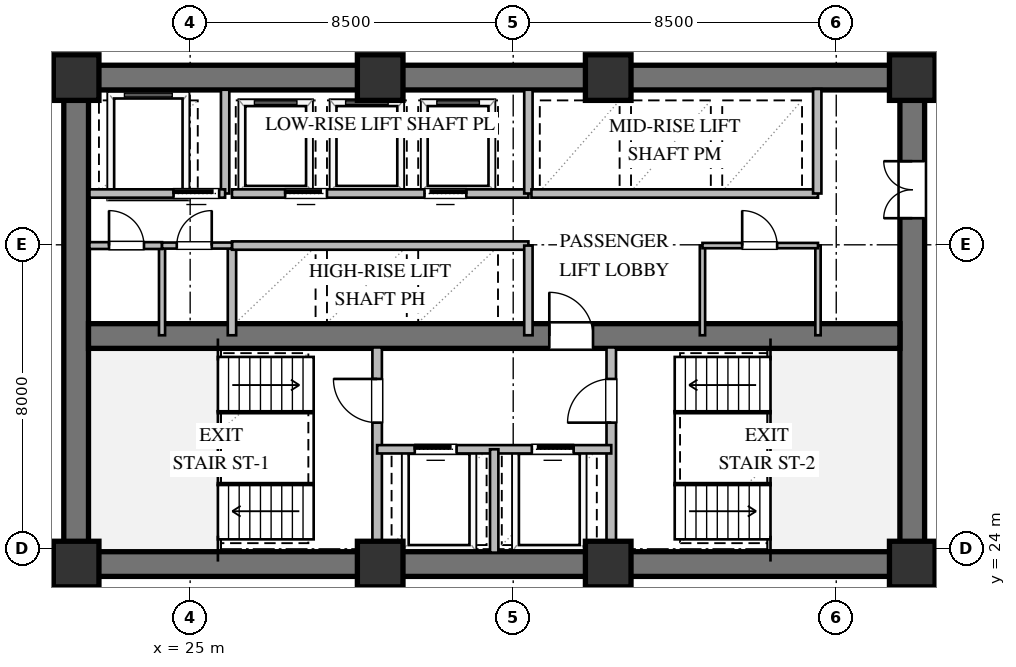
"""IFC4 building model, lengths in metres.
Left out: names, types, materials, properties, quantities, classifications, styles, units other than length and angle.
Written with IfcOpenShell. Run it as: python <this file> out.ifc"""

import sys

from ifc_helpers import new_model, si_unit, direction, frame, frame_2d, origin, origin_2d, place, context, subcontext, project, spatial, rectangle, extrude, element, fill, save


model = new_model("IFC4")
c1 = context("Model", 3, precision=1e-05, world=origin(), true_north=direction((0.0, 1.0)))
c2 = subcontext(c1, "Body", "Model", "MODEL_VIEW")
j1 = project(units=[si_unit("LENGTHUNIT", "METRE"), si_unit("PLANEANGLEUNIT", "RADIAN")], contexts=[c1])
p1 = place(None, origin())
s1 = spatial("IfcSite", under=j1, at=p1, CompositionType="ELEMENT")
p2 = place(p1, origin())
s2 = spatial("IfcBuilding", under=s1, at=p2, CompositionType="ELEMENT")
p3 = place(p2, frame((0.0, 0.0, 60.0)))
s3 = spatial("IfcBuildingStorey", under=s2, at=p3, CompositionType="ELEMENT", Elevation=60.0)
for number, where, z_axis, x_axis in (
    (1, (21.675, 23.6, 0.0), (0.0, 0.0, 1.0), (1.0, 0.0, 0.0)),
    (2, (21.675, 36.4, 0.0), (0.0, 0.0, 1.0), (1.0, 0.0, 0.0)),
):
    element("IfcWall", number, at=place(p3, frame(where, z_axis=z_axis, x_axis=x_axis)), inside=s3, PredefinedType="SHEAR", context=c2, shape_type="SweptSolid", body=[
        extrude(rectangle(XDim=22.65, YDim=0.65, at=frame_2d((11.325, 0.0))), origin(), (0.0, 0.0, 1.0), 3.36),
    ])
p4 = place(p3, frame((22.0, 23.925, 0.0), z_axis=(0.0, 0.0, 1.0), x_axis=(0.0, 1.0, 0.0)))
e3 = element("IfcWall", 3, at=p4, inside=s3, PredefinedType="SHEAR", context=c2, shape_type="SweptSolid", body=[
    extrude(rectangle(XDim=12.15, YDim=0.65, at=frame_2d((6.075, 0.0))), origin(), (0.0, 0.0, 1.0), 3.36),
])
p5 = place(p3, frame((44.0, 23.925, 0.0), z_axis=(0.0, 0.0, 1.0), x_axis=(0.0, 1.0, 0.0)))
e4 = element("IfcWall", 4, at=p5, inside=s3, PredefinedType="SHEAR", context=c2, shape_type="SweptSolid", body=[
    extrude(rectangle(XDim=12.15, YDim=0.65, at=frame_2d((6.075, 0.0))), origin(), (0.0, 0.0, 1.0), 3.36),
])
p6 = place(p5, frame((8.775, 0.0, 0.0)))
e5 = element("IfcOpeningElement", 5, at=p6, cuts=e4, PredefinedType="OPENING", context=c2, shape_type="SweptSolid", body=[
    extrude(rectangle(XDim=1.5, YDim=2.15, at=frame_2d((0.75, 1.075))), frame((0.0, 0.335, 0.0), z_axis=(0.0, -1.0, 0.0), x_axis=(1.0, 0.0, 0.0)), (0.0, 0.0, 1.0), 0.67),
])
p7 = place(p3, frame((22.325, 29.6, 0.0), z_axis=(0.0, 0.0, 1.0), x_axis=(1.0, 0.0, 0.0)))
e6 = element("IfcWall", 6, at=p7, inside=s3, PredefinedType="SHEAR", context=c2, shape_type="SweptSolid", body=[
    extrude(rectangle(XDim=21.35, YDim=0.65, at=frame_2d((10.675, 0.0))), origin(), (0.0, 0.0, 1.0), 3.36),
])
p8 = place(p7, frame((12.125, 0.0, 0.0)))
e7 = element("IfcOpeningElement", 7, at=p8, cuts=e6, PredefinedType="OPENING", context=c2, shape_type="SweptSolid", body=[
    extrude(rectangle(XDim=1.15, YDim=2.1, at=frame_2d((0.575, 1.05))), frame((0.0, 0.335, 0.0), z_axis=(0.0, -1.0, 0.0), x_axis=(1.0, 0.0, 0.0)), (0.0, 0.0, 1.0), 0.67),
])
for number, where, z_axis, x_axis in (
    (8, (22.0, 23.6, 0.0), (0.0, 0.0, 1.0), (1.0, 0.0, 0.0)),
    (9, (30.0, 23.6, 0.0), (0.0, 0.0, 1.0), (1.0, 0.0, 0.0)),
    (10, (36.0, 23.6, 0.0), (0.0, 0.0, 1.0), (1.0, 0.0, 0.0)),
    (11, (44.0, 23.6, 0.0), (0.0, 0.0, 1.0), (1.0, 0.0, 0.0)),
    (12, (44.0, 36.4, 0.0), (0.0, 0.0, 1.0), (1.0, 0.0, 0.0)),
    (13, (36.0, 36.4, 0.0), (0.0, 0.0, 1.0), (1.0, 0.0, 0.0)),
    (14, (30.0, 36.4, 0.0), (0.0, 0.0, 1.0), (1.0, 0.0, 0.0)),
    (15, (22.0, 36.4, 0.0), (0.0, 0.0, 1.0), (1.0, 0.0, 0.0)),
):
    element("IfcColumn", number, at=place(p3, frame(where, z_axis=z_axis, x_axis=x_axis)), inside=s3, PredefinedType="COLUMN", context=c2, shape_type="SweptSolid", body=[
        extrude(rectangle(XDim=1.2, YDim=1.2, at=origin_2d()), origin(), (0.0, 0.0, 1.0), 3.6),
    ])
p9 = place(p3, frame((29.92, 23.9, 0.0), z_axis=(0.0, 0.0, 1.0), x_axis=(0.0, 1.0, 0.0)))
e16 = element("IfcWall", 16, at=p9, inside=s3, PredefinedType="SOLIDWALL", context=c2, shape_type="SweptSolid", body=[
    extrude(rectangle(XDim=5.4, YDim=0.25, at=frame_2d((2.7, 0.0))), origin(), (0.0, 0.0, 1.0), 3.36),
])
p10 = place(p9, frame((3.421, 0.0, 0.0)))
e17 = element("IfcOpeningElement", 17, at=p10, cuts=e16, PredefinedType="OPENING", context=c2, shape_type="SweptSolid", body=[
    extrude(rectangle(XDim=1.15, YDim=2.1, at=frame_2d((0.575, 1.05))), frame((0.0, 0.135, 0.0), z_axis=(0.0, -1.0, 0.0), x_axis=(1.0, 0.0, 0.0)), (0.0, 0.0, 1.0), 0.27),
])
p11 = place(p3, frame((36.08, 23.9, 0.0), z_axis=(0.0, 0.0, 1.0), x_axis=(0.0, 1.0, 0.0)))
e18 = element("IfcWall", 18, at=p11, inside=s3, PredefinedType="SOLIDWALL", context=c2, shape_type="SweptSolid", body=[
    extrude(rectangle(XDim=5.4, YDim=0.25, at=frame_2d((2.7, 0.0))), origin(), (0.0, 0.0, 1.0), 3.36),
])
p12 = place(p11, frame((3.421, 0.0, 0.0)))
e19 = element("IfcOpeningElement", 19, at=p12, cuts=e18, PredefinedType="OPENING", context=c2, shape_type="SweptSolid", body=[
    extrude(rectangle(XDim=1.15, YDim=2.1, at=frame_2d((0.575, 1.05))), frame((0.0, 0.135, 0.0), z_axis=(0.0, -1.0, 0.0), x_axis=(1.0, 0.0, 0.0)), (0.0, 0.0, 1.0), 0.27),
])
p13 = place(p3, frame((29.92, 26.62, 0.0), z_axis=(0.0, 0.0, 1.0), x_axis=(1.0, 0.0, 0.0)))
e20 = element("IfcWall", 20, at=p13, inside=s3, PredefinedType="SOLIDWALL", context=c2, shape_type="SweptSolid", body=[
    extrude(rectangle(XDim=6.16, YDim=0.22, at=frame_2d((3.08, 0.0))), origin(), (0.0, 0.0, 1.0), 3.36),
])
p14 = place(p13, frame((0.99, 0.0, 0.0)))
e21 = element("IfcOpeningElement", 21, at=p14, cuts=e20, PredefinedType="OPENING", context=c2, shape_type="SweptSolid", body=[
    extrude(rectangle(XDim=1.1, YDim=2.1, at=frame_2d((0.55, 1.05))), frame((0.0, 0.12, 0.0), z_axis=(0.0, -1.0, 0.0), x_axis=(1.0, 0.0, 0.0)), (0.0, 0.0, 1.0), 0.24),
])
p15 = place(p13, frame((4.07, 0.0, 0.0)))
e22 = element("IfcOpeningElement", 22, at=p15, cuts=e20, PredefinedType="OPENING", context=c2, shape_type="SweptSolid", body=[
    extrude(rectangle(XDim=1.1, YDim=2.1, at=frame_2d((0.55, 1.05))), frame((0.0, 0.12, 0.0), z_axis=(0.0, -1.0, 0.0), x_axis=(1.0, 0.0, 0.0)), (0.0, 0.0, 1.0), 0.24),
])
p16 = place(p3, frame((33.0, 23.9, 0.0), z_axis=(0.0, 0.0, 1.0), x_axis=(0.0, 1.0, 0.0)))
e23 = element("IfcWall", 23, at=p16, inside=s3, PredefinedType="SOLIDWALL", context=c2, shape_type="SweptSolid", body=[
    extrude(rectangle(XDim=2.72, YDim=0.22, at=frame_2d((1.36, 0.0))), origin(), (0.0, 0.0, 1.0), 3.36),
])
p17 = place(p3, frame((25.92, 33.35, 0.0), z_axis=(0.0, 0.0, 1.0), x_axis=(0.0, 1.0, 0.0)))
e24 = element("IfcWall", 24, at=p17, inside=s3, PredefinedType="SOLIDWALL", context=c2, shape_type="SweptSolid", body=[
    extrude(rectangle(XDim=2.73, YDim=0.22, at=frame_2d((1.365, 0.0))), origin(), (0.0, 0.0, 1.0), 3.36),
])
p18 = place(p3, frame((22.35, 33.35, 0.0), z_axis=(0.0, 0.0, 1.0), x_axis=(1.0, 0.0, 0.0)))
e25 = element("IfcWall", 25, at=p18, inside=s3, PredefinedType="SOLIDWALL", context=c2, shape_type="SweptSolid", body=[
    extrude(rectangle(XDim=3.57, YDim=0.22, at=frame_2d((1.785, 0.0))), origin(), (0.0, 0.0, 1.0), 3.36),
])
p19 = place(p18, frame((2.213, 0.0, 0.0)))
e26 = element("IfcOpeningElement", 26, at=p19, cuts=e25, PredefinedType="OPENING", context=c2, shape_type="SweptSolid", body=[
    extrude(rectangle(XDim=1.2, YDim=2.1, at=frame_2d((0.6, 1.05))), frame((0.0, 0.12, 0.0), z_axis=(0.0, -1.0, 0.0), x_axis=(1.0, 0.0, 0.0)), (0.0, 0.0, 1.0), 0.24),
])
p20 = place(p3, frame((26.1, 29.62, 0.0), z_axis=(0.0, 0.0, 1.0), x_axis=(0.0, 1.0, 0.0)))
e27 = element("IfcWall", 27, at=p20, inside=s3, PredefinedType="SOLIDWALL", context=c2, shape_type="SweptSolid", body=[
    extrude(rectangle(XDim=2.36, YDim=0.22, at=frame_2d((1.18, 0.0))), origin(), (0.0, 0.0, 1.0), 3.36),
])
p21 = place(p3, frame((26.1, 31.98, 0.0), z_axis=(0.0, 0.0, 1.0), x_axis=(1.0, 0.0, 0.0)))
e28 = element("IfcWall", 28, at=p21, inside=s3, PredefinedType="SOLIDWALL", context=c2, shape_type="SweptSolid", body=[
    extrude(rectangle(XDim=7.8, YDim=0.22, at=frame_2d((3.9, 0.0))), origin(), (0.0, 0.0, 1.0), 3.36),
])
p22 = place(p3, frame((33.9, 29.62, 0.0), z_axis=(0.0, 0.0, 1.0), x_axis=(0.0, 1.0, 0.0)))
e29 = element("IfcWall", 29, at=p22, inside=s3, PredefinedType="SOLIDWALL", context=c2, shape_type="SweptSolid", body=[
    extrude(rectangle(XDim=2.36, YDim=0.22, at=frame_2d((1.18, 0.0))), origin(), (0.0, 0.0, 1.0), 3.36),
])
p23 = place(p3, frame((26.1, 33.35, 0.0), z_axis=(0.0, 0.0, 1.0), x_axis=(1.0, 0.0, 0.0)))
e30 = element("IfcWall", 30, at=p23, inside=s3, PredefinedType="SOLIDWALL", context=c2, shape_type="SweptSolid", body=[
    extrude(rectangle(XDim=7.8, YDim=0.22, at=frame_2d((3.9, 0.0))), origin(), (0.0, 0.0, 1.0), 3.36),
])
p24 = place(p23, frame((1.4, 0.0, 0.0)))
e31 = element("IfcOpeningElement", 31, at=p24, cuts=e30, PredefinedType="OPENING", context=c2, shape_type="SweptSolid", body=[
    extrude(rectangle(XDim=1.1, YDim=2.1, at=frame_2d((0.55, 1.05))), frame((0.0, 0.12, 0.0), z_axis=(0.0, -1.0, 0.0), x_axis=(1.0, 0.0, 0.0)), (0.0, 0.0, 1.0), 0.24),
])
p25 = place(p23, frame((5.066, 0.0, 0.0)))
e32 = element("IfcOpeningElement", 32, at=p25, cuts=e30, PredefinedType="OPENING", context=c2, shape_type="SweptSolid", body=[
    extrude(rectangle(XDim=1.1, YDim=2.1, at=frame_2d((0.55, 1.05))), frame((0.0, 0.12, 0.0), z_axis=(0.0, -1.0, 0.0), x_axis=(1.0, 0.0, 0.0)), (0.0, 0.0, 1.0), 0.24),
])
p26 = place(p3, frame((33.9, 33.35, 0.0), z_axis=(0.0, 0.0, 1.0), x_axis=(0.0, 1.0, 0.0)))
e33 = element("IfcWall", 33, at=p26, inside=s3, PredefinedType="SOLIDWALL", context=c2, shape_type="SweptSolid", body=[
    extrude(rectangle(XDim=2.73, YDim=0.22, at=frame_2d((1.365, 0.0))), origin(), (0.0, 0.0, 1.0), 3.36),
])
p27 = place(p3, frame((33.98, 33.35, 0.0), z_axis=(0.0, 0.0, 1.0), x_axis=(1.0, 0.0, 0.0)))
e34 = element("IfcWall", 34, at=p27, inside=s3, PredefinedType="SOLIDWALL", context=c2, shape_type="SweptSolid", body=[
    extrude(rectangle(XDim=7.54, YDim=0.22, at=frame_2d((3.77, 0.0))), origin(), (0.0, 0.0, 1.0), 3.36),
])
p28 = place(p3, frame((41.5, 33.35, 0.0), z_axis=(0.0, 0.0, 1.0), x_axis=(0.0, 1.0, 0.0)))
e35 = element("IfcWall", 35, at=p28, inside=s3, PredefinedType="SOLIDWALL", context=c2, shape_type="SweptSolid", body=[
    extrude(rectangle(XDim=2.75, YDim=0.22, at=frame_2d((1.375, 0.0))), origin(), (0.0, 0.0, 1.0), 3.36),
])
p29 = place(p3, frame((24.26, 29.62, 0.0), z_axis=(0.0, 0.0, 1.0), x_axis=(0.0, 1.0, 0.0)))
e36 = element("IfcWall", 36, at=p29, inside=s3, PredefinedType="PLUMBINGWALL", context=c2, shape_type="SweptSolid", body=[
    extrude(rectangle(XDim=2.36, YDim=0.16, at=frame_2d((1.18, 0.0))), origin(), (0.0, 0.0, 1.0), 3.36),
])
p30 = place(p3, frame((22.35, 31.98, 0.0), z_axis=(0.0, 0.0, 1.0), x_axis=(1.0, 0.0, 0.0)))
e37 = element("IfcWall", 37, at=p30, inside=s3, PredefinedType="PARTITIONING", context=c2, shape_type="SweptSolid", body=[
    extrude(rectangle(XDim=1.91, YDim=0.18, at=frame_2d((0.955, 0.0))), origin(), (0.0, 0.0, 1.0), 3.36),
])
p31 = place(p30, frame((0.515, 0.0, 0.0)))
e38 = element("IfcOpeningElement", 38, at=p31, cuts=e37, PredefinedType="OPENING", context=c2, shape_type="SweptSolid", body=[
    extrude(rectangle(XDim=0.92, YDim=2.1, at=frame_2d((0.46, 1.05))), frame((0.0, 0.1, 0.0), z_axis=(0.0, -1.0, 0.0), x_axis=(1.0, 0.0, 0.0)), (0.0, 0.0, 1.0), 0.2),
])
p32 = place(p3, frame((24.26, 31.98, 0.0), z_axis=(0.0, 0.0, 1.0), x_axis=(1.0, 0.0, 0.0)))
e39 = element("IfcWall", 39, at=p32, inside=s3, PredefinedType="PLUMBINGWALL", context=c2, shape_type="SweptSolid", body=[
    extrude(rectangle(XDim=1.84, YDim=0.16, at=frame_2d((0.92, 0.0))), origin(), (0.0, 0.0, 1.0), 3.36),
])
p33 = place(p32, frame((0.388, 0.0, 0.0)))
e40 = element("IfcOpeningElement", 40, at=p33, cuts=e39, PredefinedType="OPENING", context=c2, shape_type="SweptSolid", body=[
    extrude(rectangle(XDim=0.92, YDim=2.1, at=frame_2d((0.46, 1.05))), frame((0.0, 0.09, 0.0), z_axis=(0.0, -1.0, 0.0), x_axis=(1.0, 0.0, 0.0)), (0.0, 0.0, 1.0), 0.18),
])
for number, where, z_axis, x_axis in (
    (41, (38.48, 29.62, 0.0), (0.0, 0.0, 1.0), (0.0, 1.0, 0.0)),
    (42, (41.52, 29.62, 0.0), (0.0, 0.0, 1.0), (0.0, 1.0, 0.0)),
):
    element("IfcWall", number, at=place(p3, frame(where, z_axis=z_axis, x_axis=x_axis)), inside=s3, PredefinedType="PARTITIONING", context=c2, shape_type="SweptSolid", body=[
        extrude(rectangle(XDim=2.36, YDim=0.14, at=frame_2d((1.18, 0.0))), origin(), (0.0, 0.0, 1.0), 3.36),
    ])
p34 = place(p3, frame((38.48, 31.98, 0.0), z_axis=(0.0, 0.0, 1.0), x_axis=(1.0, 0.0, 0.0)))
e43 = element("IfcWall", 43, at=p34, inside=s3, PredefinedType="PARTITIONING", context=c2, shape_type="SweptSolid", body=[
    extrude(rectangle(XDim=3.04, YDim=0.14, at=frame_2d((1.52, 0.0))), origin(), (0.0, 0.0, 1.0), 3.36),
])
p35 = place(p34, frame((1.045, 0.0, 0.0)))
e44 = element("IfcOpeningElement", 44, at=p35, cuts=e43, PredefinedType="OPENING", context=c2, shape_type="SweptSolid", body=[
    extrude(rectangle(XDim=0.92, YDim=2.1, at=frame_2d((0.46, 1.05))), frame((0.0, 0.08, 0.0), z_axis=(0.0, -1.0, 0.0), x_axis=(1.0, 0.0, 0.0)), (0.0, 0.0, 1.0), 0.16),
])
p36 = place(p10, origin())
e45 = element("IfcDoor", 45, at=p36, inside=s3, OperationType="SINGLE_SWING_RIGHT", PredefinedType="DOOR", context=c2, shape_type="SweptSolid", body=[
    extrude(rectangle(XDim=1.15, YDim=2.1, at=frame_2d((0.575, 1.05))), frame((0.0, 0.025, 0.0), z_axis=(0.0, -1.0, 0.0), x_axis=(1.0, 0.0, 0.0)), (0.0, 0.0, 1.0), 0.05),
])
fill(e17, e45)
p37 = place(p12, origin())
e46 = element("IfcDoor", 46, at=p37, inside=s3, OperationType="SINGLE_SWING_LEFT", PredefinedType="DOOR", context=c2, shape_type="SweptSolid", body=[
    extrude(rectangle(XDim=1.15, YDim=2.1, at=frame_2d((0.575, 1.05))), frame((0.0, 0.025, 0.0), z_axis=(0.0, -1.0, 0.0), x_axis=(1.0, 0.0, 0.0)), (0.0, 0.0, 1.0), 0.05),
])
fill(e19, e46)
p38 = place(p14, origin())
e47 = element("IfcDoor", 47, at=p38, inside=s3, OperationType="SLIDING_TO_LEFT", PredefinedType="DOOR", context=c2, shape_type="SweptSolid", body=[
    extrude(rectangle(XDim=1.1, YDim=2.1, at=frame_2d((0.55, 1.05))), frame((0.0, 0.025, 0.0), z_axis=(0.0, -1.0, 0.0), x_axis=(1.0, 0.0, 0.0)), (0.0, 0.0, 1.0), 0.05),
])
fill(e21, e47)
p39 = place(p15, origin())
e48 = element("IfcDoor", 48, at=p39, inside=s3, OperationType="SLIDING_TO_RIGHT", PredefinedType="DOOR", context=c2, shape_type="SweptSolid", body=[
    extrude(rectangle(XDim=1.1, YDim=2.1, at=frame_2d((0.55, 1.05))), frame((0.0, 0.025, 0.0), z_axis=(0.0, -1.0, 0.0), x_axis=(1.0, 0.0, 0.0)), (0.0, 0.0, 1.0), 0.05),
])
fill(e22, e48)
p40 = place(p8, origin())
e49 = element("IfcDoor", 49, at=p40, inside=s3, OperationType="SINGLE_SWING_LEFT", PredefinedType="DOOR", context=c2, shape_type="SweptSolid", body=[
    extrude(rectangle(XDim=1.15, YDim=2.1, at=frame_2d((0.575, 1.05))), frame((0.0, 0.025, 0.0), z_axis=(0.0, -1.0, 0.0), x_axis=(1.0, 0.0, 0.0)), (0.0, 0.0, 1.0), 0.05),
])
fill(e7, e49)
p41 = place(p6, origin())
e50 = element("IfcDoor", 50, at=p41, inside=s3, OperationType="DOUBLE_DOOR_SINGLE_SWING", PredefinedType="DOOR", context=c2, shape_type="SweptSolid", body=[
    extrude(rectangle(XDim=1.5, YDim=2.15, at=frame_2d((0.75, 1.075))), frame((0.0, 0.025, 0.0), z_axis=(0.0, -1.0, 0.0), x_axis=(1.0, 0.0, 0.0)), (0.0, 0.0, 1.0), 0.05),
])
fill(e5, e50)
p42 = place(p19, origin())
e51 = element("IfcDoor", 51, at=p42, inside=s3, OperationType="SLIDING_TO_LEFT", PredefinedType="DOOR", context=c2, shape_type="SweptSolid", body=[
    extrude(rectangle(XDim=1.2, YDim=2.1, at=frame_2d((0.6, 1.05))), frame((0.0, 0.025, 0.0), z_axis=(0.0, -1.0, 0.0), x_axis=(1.0, 0.0, 0.0)), (0.0, 0.0, 1.0), 0.05),
])
fill(e26, e51)
p43 = place(p24, origin())
e52 = element("IfcDoor", 52, at=p43, inside=s3, OperationType="SLIDING_TO_LEFT", PredefinedType="DOOR", context=c2, shape_type="SweptSolid", body=[
    extrude(rectangle(XDim=1.1, YDim=2.1, at=frame_2d((0.55, 1.05))), frame((0.0, 0.025, 0.0), z_axis=(0.0, -1.0, 0.0), x_axis=(1.0, 0.0, 0.0)), (0.0, 0.0, 1.0), 0.05),
])
fill(e31, e52)
p44 = place(p25, origin())
e53 = element("IfcDoor", 53, at=p44, inside=s3, OperationType="SLIDING_TO_RIGHT", PredefinedType="DOOR", context=c2, shape_type="SweptSolid", body=[
    extrude(rectangle(XDim=1.1, YDim=2.1, at=frame_2d((0.55, 1.05))), frame((0.0, 0.025, 0.0), z_axis=(0.0, -1.0, 0.0), x_axis=(1.0, 0.0, 0.0)), (0.0, 0.0, 1.0), 0.05),
])
fill(e32, e53)
p45 = place(p31, origin())
e54 = element("IfcDoor", 54, at=p45, inside=s3, OperationType="SINGLE_SWING_LEFT", PredefinedType="DOOR", context=c2, shape_type="SweptSolid", body=[
    extrude(rectangle(XDim=0.92, YDim=2.1, at=frame_2d((0.46, 1.05))), frame((0.0, 0.025, 0.0), z_axis=(0.0, -1.0, 0.0), x_axis=(1.0, 0.0, 0.0)), (0.0, 0.0, 1.0), 0.05),
])
fill(e38, e54)
p46 = place(p33, origin())
e55 = element("IfcDoor", 55, at=p46, inside=s3, OperationType="SINGLE_SWING_RIGHT", PredefinedType="DOOR", context=c2, shape_type="SweptSolid", body=[
    extrude(rectangle(XDim=0.92, YDim=2.1, at=frame_2d((0.46, 1.05))), frame((0.0, 0.025, 0.0), z_axis=(0.0, -1.0, 0.0), x_axis=(1.0, 0.0, 0.0)), (0.0, 0.0, 1.0), 0.05),
])
fill(e40, e55)
p47 = place(p35, origin())
e56 = element("IfcDoor", 56, at=p47, inside=s3, OperationType="SINGLE_SWING_LEFT", PredefinedType="DOOR", context=c2, shape_type="SweptSolid", body=[
    extrude(rectangle(XDim=0.92, YDim=2.1, at=frame_2d((0.46, 1.05))), frame((0.0, 0.025, 0.0), z_axis=(0.0, -1.0, 0.0), x_axis=(1.0, 0.0, 0.0)), (0.0, 0.0, 1.0), 0.05),
])
fill(e44, e56)
save(model, sys.argv[1])
